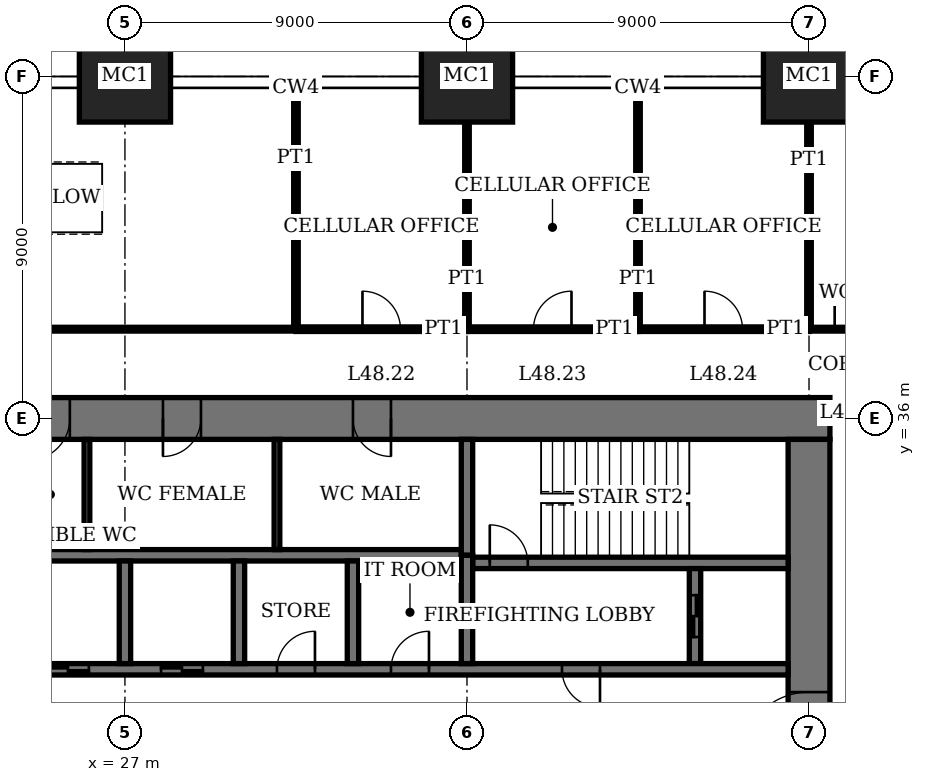
"""IFC4 building model, lengths in metres.
Left out: names, types, materials, properties, quantities, classifications, styles, units other than length and angle.
Written with IfcOpenShell. Run it as: python <this file> out.ifc"""

import sys

from ifc_helpers import new_model, si_unit, direction, frame, frame_2d, origin, origin_2d, place, context, subcontext, project, spatial, rectangle, extrude, element, fill, save


model = new_model("IFC4")
c1 = context("Model", 3, precision=1e-05, world=origin(), true_north=direction((0.0, 1.0)))
c2 = subcontext(c1, "Body", "Model", "MODEL_VIEW")
j1 = project(units=[si_unit("LENGTHUNIT", "METRE"), si_unit("PLANEANGLEUNIT", "RADIAN")], contexts=[c1])
p1 = place(None, origin())
s1 = spatial("IfcSite", under=j1, at=p1, CompositionType="ELEMENT")
p2 = place(p1, origin())
s2 = spatial("IfcBuilding", under=s1, at=p2, CompositionType="ELEMENT")
p3 = place(p2, frame((0.0, 0.0, 198.2)))
s3 = spatial("IfcBuildingStorey", under=s2, at=p3, CompositionType="ELEMENT", Elevation=198.2)
for number, where, z_axis, x_axis in (
    (1, (27.0, 45.0, 0.0), (0.0, 0.0, 1.0), (1.0, 0.0, 0.0)),
    (2, (36.0, 45.0, 0.0), (0.0, 0.0, 1.0), (1.0, 0.0, 0.0)),
    (3, (45.0, 45.0, 0.0), (0.0, 0.0, 1.0), (1.0, 0.0, 0.0)),
):
    element("IfcColumn", number, at=place(p3, frame(where, z_axis=z_axis, x_axis=x_axis)), inside=s3, PredefinedType="COLUMN", context=c2, shape_type="SweptSolid", body=[
        extrude(rectangle(XDim=2.4, YDim=2.4, at=origin_2d()), origin(), (0.0, 0.0, 1.0), 4.0),
    ])
p4 = place(p3, frame((45.55, 36.0, 0.0), z_axis=(0.0, 0.0, 1.0), x_axis=(-1.0, 0.0, 0.0)))
e4 = element("IfcWall", 4, at=p4, inside=s3, PredefinedType="SHEAR", context=c2, shape_type="SweptSolid", body=[
    extrude(rectangle(XDim=28.1, YDim=1.1, at=frame_2d((14.05, 0.0))), origin(), (0.0, 0.0, 1.0), 4.0),
])
p5 = place(p4, frame((11.55, 0.0, 0.0)))
e5 = element("IfcOpeningElement", 5, at=p5, cuts=e4, PredefinedType="OPENING", context=c2, shape_type="SweptSolid", body=[
    extrude(rectangle(XDim=1.0, YDim=2.4, at=frame_2d((0.5, 1.2))), frame((0.0, 0.56, 0.0), z_axis=(0.0, -1.0, 0.0), x_axis=(1.0, 0.0, 0.0)), (0.0, 0.0, 1.0), 1.12),
])
p6 = place(p4, frame((16.55, 0.0, 0.0)))
e6 = element("IfcOpeningElement", 6, at=p6, cuts=e4, PredefinedType="OPENING", context=c2, shape_type="SweptSolid", body=[
    extrude(rectangle(XDim=1.0, YDim=2.4, at=frame_2d((0.5, 1.2))), frame((0.0, 0.56, 0.0), z_axis=(0.0, -1.0, 0.0), x_axis=(1.0, 0.0, 0.0)), (0.0, 0.0, 1.0), 1.12),
])
p7 = place(p4, frame((20.0, 0.0, 0.0)))
e7 = element("IfcOpeningElement", 7, at=p7, cuts=e4, PredefinedType="OPENING", context=c2, shape_type="SweptSolid", body=[
    extrude(rectangle(XDim=1.1, YDim=2.4, at=frame_2d((0.55, 1.2))), frame((0.0, 0.56, 0.0), z_axis=(0.0, -1.0, 0.0), x_axis=(1.0, 0.0, 0.0)), (0.0, 0.0, 1.0), 1.12),
])
p8 = place(p4, frame((24.05, 0.0, 0.0)))
e8 = element("IfcOpeningElement", 8, at=p8, cuts=e4, PredefinedType="OPENING", context=c2, shape_type="SweptSolid", body=[
    extrude(rectangle(XDim=1.0, YDim=2.4, at=frame_2d((0.5, 1.2))), frame((0.0, 0.56, 0.0), z_axis=(0.0, -1.0, 0.0), x_axis=(1.0, 0.0, 0.0)), (0.0, 0.0, 1.0), 1.12),
])
p9 = place(p3, frame((45.0, 18.55, 0.0), z_axis=(0.0, 0.0, 1.0), x_axis=(0.0, 1.0, 0.0)))
e9 = element("IfcWall", 9, at=p9, inside=s3, PredefinedType="SHEAR", context=c2, shape_type="SweptSolid", body=[
    extrude(rectangle(XDim=16.9, YDim=1.1, at=frame_2d((8.45, 0.0))), origin(), (0.0, 0.0, 1.0), 4.0),
])
p10 = place(p9, frame((8.45, 0.0, 0.0)))
e10 = element("IfcOpeningElement", 10, at=p10, cuts=e9, PredefinedType="OPENING", context=c2, shape_type="SweptSolid", body=[
    extrude(rectangle(XDim=1.8, YDim=2.4, at=frame_2d((0.9, 1.2))), frame((0.0, 0.56, 0.0), z_axis=(0.0, -1.0, 0.0), x_axis=(1.0, 0.0, 0.0)), (0.0, 0.0, 1.0), 1.12),
])
p11 = place(p3, frame((36.15, 32.2, 0.0), z_axis=(0.0, 0.0, 1.0), x_axis=(1.0, 0.0, 0.0)))
e11 = element("IfcWall", 11, at=p11, inside=s3, PredefinedType="SHEAR", context=c2, shape_type="SweptSolid", body=[
    extrude(rectangle(XDim=8.3, YDim=0.3, at=frame_2d((4.15, 0.0))), origin(), (0.0, 0.0, 1.0), 4.0),
])
p12 = place(p11, frame((0.45, 0.0, 0.0)))
e12 = element("IfcOpeningElement", 12, at=p12, cuts=e11, PredefinedType="OPENING", context=c2, shape_type="SweptSolid", body=[
    extrude(rectangle(XDim=1.0, YDim=2.4, at=frame_2d((0.5, 1.2))), frame((0.0, 0.16, 0.0), z_axis=(0.0, -1.0, 0.0), x_axis=(1.0, 0.0, 0.0)), (0.0, 0.0, 1.0), 0.32),
])
p13 = place(p3, frame((36.0, 32.4, 0.0), z_axis=(0.0, 0.0, 1.0), x_axis=(0.0, 1.0, 0.0)))
e13 = element("IfcWall", 13, at=p13, inside=s3, PredefinedType="SHEAR", context=c2, shape_type="SweptSolid", body=[
    extrude(rectangle(XDim=3.05, YDim=0.3, at=frame_2d((1.525, 0.0))), origin(), (0.0, 0.0, 1.0), 4.0),
])
p14 = place(p3, frame((42.0, 29.55, 0.0), z_axis=(0.0, 0.0, 1.0), x_axis=(0.0, 1.0, 0.0)))
e14 = element("IfcWall", 14, at=p14, inside=s3, PredefinedType="SHEAR", context=c2, shape_type="SweptSolid", body=[
    extrude(rectangle(XDim=2.5, YDim=0.3, at=frame_2d((1.25, 0.0))), origin(), (0.0, 0.0, 1.0), 4.0),
])
p15 = place(p14, frame((0.7, 0.0, 0.0)))
e15 = element("IfcOpeningElement", 15, at=p15, cuts=e14, PredefinedType="OPENING", context=c2, shape_type="SweptSolid", body=[
    extrude(rectangle(XDim=1.1, YDim=2.4, at=frame_2d((0.55, 1.2))), frame((0.0, 0.16, 0.0), z_axis=(0.0, -1.0, 0.0), x_axis=(1.0, 0.0, 0.0)), (0.0, 0.0, 1.0), 0.32),
])
p16 = place(p3, frame((18.55, 29.4, 0.0), z_axis=(0.0, 0.0, 1.0), x_axis=(1.0, 0.0, 0.0)))
e16 = element("IfcWall", 16, at=p16, inside=s3, PredefinedType="SHEAR", context=c2, shape_type="SweptSolid", body=[
    extrude(rectangle(XDim=25.9, YDim=0.3, at=frame_2d((12.95, 0.0))), origin(), (0.0, 0.0, 1.0), 4.0),
])
p17 = place(p16, frame((19.95, 0.0, 0.0)))
e17 = element("IfcOpeningElement", 17, at=p17, cuts=e16, PredefinedType="OPENING", context=c2, shape_type="SweptSolid", body=[
    extrude(rectangle(XDim=1.0, YDim=2.4, at=frame_2d((0.5, 1.2))), frame((0.0, 0.16, 0.0), z_axis=(0.0, -1.0, 0.0), x_axis=(1.0, 0.0, 0.0)), (0.0, 0.0, 1.0), 0.32),
])
p18 = place(p16, frame((0.5, 0.0, 0.0)))
e18 = element("IfcOpeningElement", 18, at=p18, cuts=e16, PredefinedType="OPENING", context=c2, shape_type="SweptSolid", body=[
    extrude(rectangle(XDim=0.9, YDim=2.1, at=frame_2d((0.45, 1.05))), frame((0.0, 0.16, 0.0), z_axis=(0.0, -1.0, 0.0), x_axis=(1.0, 0.0, 0.0)), (0.0, 0.0, 1.0), 0.32),
])
p19 = place(p16, frame((15.45, 0.0, 0.0)))
e19 = element("IfcOpeningElement", 19, at=p19, cuts=e16, PredefinedType="OPENING", context=c2, shape_type="SweptSolid", body=[
    extrude(rectangle(XDim=1.0, YDim=2.4, at=frame_2d((0.5, 1.2))), frame((0.0, 0.16, 0.0), z_axis=(0.0, -1.0, 0.0), x_axis=(1.0, 0.0, 0.0)), (0.0, 0.0, 1.0), 0.32),
])
p20 = place(p16, frame((12.45, 0.0, 0.0)))
e20 = element("IfcOpeningElement", 20, at=p20, cuts=e16, PredefinedType="OPENING", context=c2, shape_type="SweptSolid", body=[
    extrude(rectangle(XDim=1.0, YDim=2.4, at=frame_2d((0.5, 1.2))), frame((0.0, 0.16, 0.0), z_axis=(0.0, -1.0, 0.0), x_axis=(1.0, 0.0, 0.0)), (0.0, 0.0, 1.0), 0.32),
])
p21 = place(p16, frame((9.4, 0.0, 0.0)))
e21 = element("IfcOpeningElement", 21, at=p21, cuts=e16, PredefinedType="OPENING", context=c2, shape_type="SweptSolid", body=[
    extrude(rectangle(XDim=1.1, YDim=2.4, at=frame_2d((0.55, 1.2))), frame((0.0, 0.16, 0.0), z_axis=(0.0, -1.0, 0.0), x_axis=(1.0, 0.0, 0.0)), (0.0, 0.0, 1.0), 0.32),
])
p22 = place(p16, frame((6.4, 0.0, 0.0)))
e22 = element("IfcOpeningElement", 22, at=p22, cuts=e16, PredefinedType="OPENING", context=c2, shape_type="SweptSolid", body=[
    extrude(rectangle(XDim=1.1, YDim=2.4, at=frame_2d((0.55, 1.2))), frame((0.0, 0.16, 0.0), z_axis=(0.0, -1.0, 0.0), x_axis=(1.0, 0.0, 0.0)), (0.0, 0.0, 1.0), 0.32),
])
p23 = place(p16, frame((3.3, 0.0, 0.0)))
e23 = element("IfcOpeningElement", 23, at=p23, cuts=e16, PredefinedType="OPENING", context=c2, shape_type="SweptSolid", body=[
    extrude(rectangle(XDim=1.3, YDim=2.4, at=frame_2d((0.65, 1.2))), frame((0.0, 0.16, 0.0), z_axis=(0.0, -1.0, 0.0), x_axis=(1.0, 0.0, 0.0)), (0.0, 0.0, 1.0), 0.32),
])
p24 = place(p3, frame((18.55, 32.4, 0.0), z_axis=(0.0, 0.0, 1.0), x_axis=(1.0, 0.0, 0.0)))
e24 = element("IfcWall", 24, at=p24, inside=s3, PredefinedType="SHEAR", context=c2, shape_type="SweptSolid", body=[
    extrude(rectangle(XDim=17.3, YDim=0.3, at=frame_2d((8.65, 0.0))), origin(), (0.0, 0.0, 1.0), 4.0),
])
for number, where, z_axis, x_axis in (
    (25, (33.0, 29.55, 0.0), (0.0, 0.0, 1.0), (0.0, 1.0, 0.0)),
    (26, (30.0, 29.55, 0.0), (0.0, 0.0, 1.0), (0.0, 1.0, 0.0)),
    (27, (27.0, 29.55, 0.0), (0.0, 0.0, 1.0), (0.0, 1.0, 0.0)),
):
    element("IfcWall", number, at=place(p3, frame(where, z_axis=z_axis, x_axis=x_axis)), inside=s3, PredefinedType="SHEAR", context=c2, shape_type="SweptSolid", body=[
        extrude(rectangle(XDim=2.7, YDim=0.3, at=frame_2d((1.35, 0.0))), origin(), (0.0, 0.0, 1.0), 4.0),
    ])
p25 = place(p3, frame((36.0, 29.55, 0.0), z_axis=(0.0, 0.0, 1.0), x_axis=(0.0, 1.0, 0.0)))
e28 = element("IfcWall", 28, at=p25, inside=s3, PredefinedType="SHEAR", context=c2, shape_type="SweptSolid", body=[
    extrude(rectangle(XDim=2.85, YDim=0.3, at=frame_2d((1.425, 0.0))), origin(), (0.0, 0.0, 1.0), 4.0),
])
p26 = place(p3, frame((31.5, 38.35, 0.0), z_axis=(0.0, 0.0, 1.0), x_axis=(1.0, 0.0, 0.0)))
e29 = element("IfcWall", 29, at=p26, inside=s3, PredefinedType="PARTITIONING", context=c2, shape_type="SweptSolid", body=[
    extrude(rectangle(XDim=4.5, YDim=0.12, at=frame_2d((2.25, 0.0))), origin(), (0.0, 0.0, 1.0), 3.75),
])
p27 = place(p26, frame((1.75, 0.0, 0.0)))
e30 = element("IfcOpeningElement", 30, at=p27, cuts=e29, PredefinedType="OPENING", context=c2, shape_type="SweptSolid", body=[
    extrude(rectangle(XDim=1.0, YDim=2.4, at=frame_2d((0.5, 1.2))), frame((0.0, 0.07, 0.0), z_axis=(0.0, -1.0, 0.0), x_axis=(1.0, 0.0, 0.0)), (0.0, 0.0, 1.0), 0.14),
])
p28 = place(p3, frame((36.0, 38.35, 0.0), z_axis=(0.0, 0.0, 1.0), x_axis=(1.0, 0.0, 0.0)))
e31 = element("IfcWall", 31, at=p28, inside=s3, PredefinedType="PARTITIONING", context=c2, shape_type="SweptSolid", body=[
    extrude(rectangle(XDim=4.5, YDim=0.12, at=frame_2d((2.25, 0.0))), origin(), (0.0, 0.0, 1.0), 3.75),
])
p29 = place(p28, frame((1.75, 0.0, 0.0)))
e32 = element("IfcOpeningElement", 32, at=p29, cuts=e31, PredefinedType="OPENING", context=c2, shape_type="SweptSolid", body=[
    extrude(rectangle(XDim=1.0, YDim=2.4, at=frame_2d((0.5, 1.2))), frame((0.0, 0.07, 0.0), z_axis=(0.0, -1.0, 0.0), x_axis=(1.0, 0.0, 0.0)), (0.0, 0.0, 1.0), 0.14),
])
p30 = place(p3, frame((40.5, 38.35, 0.0), z_axis=(0.0, 0.0, 1.0), x_axis=(1.0, 0.0, 0.0)))
e33 = element("IfcWall", 33, at=p30, inside=s3, PredefinedType="PARTITIONING", context=c2, shape_type="SweptSolid", body=[
    extrude(rectangle(XDim=4.5, YDim=0.12, at=frame_2d((2.25, 0.0))), origin(), (0.0, 0.0, 1.0), 3.75),
])
p31 = place(p30, frame((1.75, 0.0, 0.0)))
e34 = element("IfcOpeningElement", 34, at=p31, cuts=e33, PredefinedType="OPENING", context=c2, shape_type="SweptSolid", body=[
    extrude(rectangle(XDim=1.0, YDim=2.4, at=frame_2d((0.5, 1.2))), frame((0.0, 0.07, 0.0), z_axis=(0.0, -1.0, 0.0), x_axis=(1.0, 0.0, 0.0)), (0.0, 0.0, 1.0), 0.14),
])
p32 = place(p3, frame((15.65, 38.35, 0.0), z_axis=(0.0, 0.0, 1.0), x_axis=(1.0, 0.0, 0.0)))
e35 = element("IfcWall", 35, at=p32, inside=s3, PredefinedType="PARTITIONING", context=c2, shape_type="SweptSolid", body=[
    extrude(rectangle(XDim=15.85, YDim=0.1, at=frame_2d((7.925, 0.0))), origin(), (0.0, 0.0, 1.0), 3.75),
])
p33 = place(p32, frame((7.425, 0.0, 0.0)))
e36 = element("IfcOpeningElement", 36, at=p33, cuts=e35, PredefinedType="OPENING", context=c2, shape_type="SweptSolid", body=[
    extrude(rectangle(XDim=1.0, YDim=2.4, at=frame_2d((0.5, 1.2))), frame((0.0, 0.06, 0.0), z_axis=(0.0, -1.0, 0.0), x_axis=(1.0, 0.0, 0.0)), (0.0, 0.0, 1.0), 0.12),
])
p34 = place(p3, frame((45.0, 38.35, 0.0), z_axis=(0.0, 0.0, 1.0), x_axis=(1.0, 0.0, 0.0)))
e37 = element("IfcWall", 37, at=p34, inside=s3, PredefinedType="PARTITIONING", context=c2, shape_type="SweptSolid", body=[
    extrude(rectangle(XDim=2.35, YDim=0.1, at=frame_2d((1.175, 0.0))), origin(), (0.0, 0.0, 1.0), 3.75),
])
p35 = place(p34, frame((0.675, 0.0, 0.0)))
e38 = element("IfcOpeningElement", 38, at=p35, cuts=e37, PredefinedType="OPENING", context=c2, shape_type="SweptSolid", body=[
    extrude(rectangle(XDim=1.0, YDim=2.4, at=frame_2d((0.5, 1.2))), frame((0.0, 0.06, 0.0), z_axis=(0.0, -1.0, 0.0), x_axis=(1.0, 0.0, 0.0)), (0.0, 0.0, 1.0), 0.12),
])
p36 = place(p3, frame((31.5, 38.35, 0.0), z_axis=(0.0, 0.0, 1.0), x_axis=(0.0, 1.0, 0.0)))
e39 = element("IfcWall", 39, at=p36, inside=s3, PredefinedType="PARTITIONING", context=c2, shape_type="SweptSolid", body=[
    extrude(rectangle(XDim=6.34, YDim=0.12, at=frame_2d((3.17, 0.0))), origin(), (0.0, 0.0, 1.0), 3.75),
])
p37 = place(p3, frame((36.0, 38.35, 0.0), z_axis=(0.0, 0.0, 1.0), x_axis=(0.0, 1.0, 0.0)))
e40 = element("IfcWall", 40, at=p37, inside=s3, PredefinedType="PARTITIONING", context=c2, shape_type="SweptSolid", body=[
    extrude(rectangle(XDim=5.45, YDim=0.12, at=frame_2d((2.725, 0.0))), origin(), (0.0, 0.0, 1.0), 3.05),
])
p38 = place(p3, frame((40.5, 38.35, 0.0), z_axis=(0.0, 0.0, 1.0), x_axis=(0.0, 1.0, 0.0)))
e41 = element("IfcWall", 41, at=p38, inside=s3, PredefinedType="PARTITIONING", context=c2, shape_type="SweptSolid", body=[
    extrude(rectangle(XDim=6.34, YDim=0.12, at=frame_2d((3.17, 0.0))), origin(), (0.0, 0.0, 1.0), 3.75),
])
p39 = place(p3, frame((45.0, 38.35, 0.0), z_axis=(0.0, 0.0, 1.0), x_axis=(0.0, 1.0, 0.0)))
e42 = element("IfcWall", 42, at=p39, inside=s3, PredefinedType="PARTITIONING", context=c2, shape_type="SweptSolid", body=[
    extrude(rectangle(XDim=5.45, YDim=0.12, at=frame_2d((2.725, 0.0))), origin(), (0.0, 0.0, 1.0), 3.05),
])
for number, where, z_axis, x_axis in (
    (43, (31.0, 32.55, 0.0), (0.0, 0.0, 1.0), (0.0, 1.0, 0.0)),
    (44, (26.0, 32.55, 0.0), (0.0, 0.0, 1.0), (0.0, 1.0, 0.0)),
):
    element("IfcWall", number, at=place(p3, frame(where, z_axis=z_axis, x_axis=x_axis)), inside=s3, PredefinedType="PARTITIONING", context=c2, shape_type="SweptSolid", body=[
        extrude(rectangle(XDim=2.9, YDim=0.15, at=frame_2d((1.45, 0.0))), origin(), (0.0, 0.0, 1.0), 3.75),
    ])
p40 = place(p10, origin())
e45 = element("IfcDoor", 45, at=p40, inside=s3, OperationType="DOUBLE_DOOR_DOUBLE_SWING", PredefinedType="DOOR", context=c2, shape_type="SweptSolid", body=[
    extrude(rectangle(XDim=1.8, YDim=2.4, at=frame_2d((0.9, 1.2))), frame((0.0, 0.03, 0.0), z_axis=(0.0, -1.0, 0.0), x_axis=(1.0, 0.0, 0.0)), (0.0, 0.0, 1.0), 0.06),
    extrude(rectangle(XDim=0.04, YDim=2.4, at=frame_2d((0.02, 1.2))), frame((0.0, 0.55, 0.0), z_axis=(0.0, -1.0, 0.0), x_axis=(1.0, 0.0, 0.0)), (0.0, 0.0, 1.0), 1.1),
    extrude(rectangle(XDim=0.04, YDim=2.4, at=frame_2d((1.78, 1.2))), frame((0.0, 0.55, 0.0), z_axis=(0.0, -1.0, 0.0), x_axis=(1.0, 0.0, 0.0)), (0.0, 0.0, 1.0), 1.1),
    extrude(rectangle(XDim=1.8, YDim=0.04, at=frame_2d((0.9, 2.38))), frame((0.0, 0.55, 0.0), z_axis=(0.0, -1.0, 0.0), x_axis=(1.0, 0.0, 0.0)), (0.0, 0.0, 1.0), 1.1),
])
fill(e10, e45)
p41 = place(p5, origin())
e46 = element("IfcDoor", 46, at=p41, inside=s3, OperationType="SINGLE_SWING_RIGHT", PredefinedType="DOOR", context=c2, shape_type="SweptSolid", body=[
    extrude(rectangle(XDim=1.0, YDim=2.4, at=frame_2d((0.5, 1.2))), frame((0.0, 0.025, 0.0), z_axis=(0.0, -1.0, 0.0), x_axis=(1.0, 0.0, 0.0)), (0.0, 0.0, 1.0), 0.05),
    extrude(rectangle(XDim=0.04, YDim=2.4, at=frame_2d((0.02, 1.2))), frame((0.0, 0.4, 0.0), z_axis=(0.0, -1.0, 0.0), x_axis=(1.0, 0.0, 0.0)), (0.0, 0.0, 1.0), 0.8),
    extrude(rectangle(XDim=0.04, YDim=2.4, at=frame_2d((0.98, 1.2))), frame((0.0, 0.4, 0.0), z_axis=(0.0, -1.0, 0.0), x_axis=(1.0, 0.0, 0.0)), (0.0, 0.0, 1.0), 0.8),
    extrude(rectangle(XDim=1.0, YDim=0.04, at=frame_2d((0.5, 2.38))), frame((0.0, 0.4, 0.0), z_axis=(0.0, -1.0, 0.0), x_axis=(1.0, 0.0, 0.0)), (0.0, 0.0, 1.0), 0.8),
])
fill(e5, e46)
p42 = place(p6, origin())
e47 = element("IfcDoor", 47, at=p42, inside=s3, OperationType="SINGLE_SWING_LEFT", PredefinedType="DOOR", context=c2, shape_type="SweptSolid", body=[
    extrude(rectangle(XDim=1.0, YDim=2.4, at=frame_2d((0.5, 1.2))), frame((0.0, 0.025, 0.0), z_axis=(0.0, -1.0, 0.0), x_axis=(1.0, 0.0, 0.0)), (0.0, 0.0, 1.0), 0.05),
    extrude(rectangle(XDim=0.04, YDim=2.4, at=frame_2d((0.02, 1.2))), frame((0.0, 0.4, 0.0), z_axis=(0.0, -1.0, 0.0), x_axis=(1.0, 0.0, 0.0)), (0.0, 0.0, 1.0), 0.8),
    extrude(rectangle(XDim=0.04, YDim=2.4, at=frame_2d((0.98, 1.2))), frame((0.0, 0.4, 0.0), z_axis=(0.0, -1.0, 0.0), x_axis=(1.0, 0.0, 0.0)), (0.0, 0.0, 1.0), 0.8),
    extrude(rectangle(XDim=1.0, YDim=0.04, at=frame_2d((0.5, 2.38))), frame((0.0, 0.4, 0.0), z_axis=(0.0, -1.0, 0.0), x_axis=(1.0, 0.0, 0.0)), (0.0, 0.0, 1.0), 0.8),
])
fill(e6, e47)
p43 = place(p7, origin())
e48 = element("IfcDoor", 48, at=p43, inside=s3, OperationType="SINGLE_SWING_LEFT", PredefinedType="DOOR", context=c2, shape_type="SweptSolid", body=[
    extrude(rectangle(XDim=1.1, YDim=2.4, at=frame_2d((0.55, 1.2))), frame((0.0, 0.025, 0.0), z_axis=(0.0, -1.0, 0.0), x_axis=(1.0, 0.0, 0.0)), (0.0, 0.0, 1.0), 0.05),
    extrude(rectangle(XDim=0.04, YDim=2.4, at=frame_2d((0.02, 1.2))), frame((0.0, 0.44, 0.0), z_axis=(0.0, -1.0, 0.0), x_axis=(1.0, 0.0, 0.0)), (0.0, 0.0, 1.0), 0.88),
    extrude(rectangle(XDim=0.04, YDim=2.4, at=frame_2d((1.08, 1.2))), frame((0.0, 0.44, 0.0), z_axis=(0.0, -1.0, 0.0), x_axis=(1.0, 0.0, 0.0)), (0.0, 0.0, 1.0), 0.88),
    extrude(rectangle(XDim=1.1, YDim=0.04, at=frame_2d((0.55, 2.38))), frame((0.0, 0.44, 0.0), z_axis=(0.0, -1.0, 0.0), x_axis=(1.0, 0.0, 0.0)), (0.0, 0.0, 1.0), 0.88),
])
fill(e7, e48)
p44 = place(p12, origin())
e49 = element("IfcDoor", 49, at=p44, inside=s3, OperationType="SINGLE_SWING_RIGHT", PredefinedType="DOOR", context=c2, shape_type="SweptSolid", body=[
    extrude(rectangle(XDim=1.0, YDim=2.4, at=frame_2d((0.5, 1.2))), frame((0.0, 0.03, 0.0), z_axis=(0.0, -1.0, 0.0), x_axis=(1.0, 0.0, 0.0)), (0.0, 0.0, 1.0), 0.06),
])
fill(e12, e49)
p45 = place(p17, origin())
e50 = element("IfcDoor", 50, at=p45, inside=s3, OperationType="SINGLE_SWING_RIGHT", PredefinedType="DOOR", context=c2, shape_type="SweptSolid", body=[
    extrude(rectangle(XDim=1.0, YDim=2.4, at=frame_2d((0.5, 1.2))), frame((0.0, 0.03, 0.0), z_axis=(0.0, -1.0, 0.0), x_axis=(1.0, 0.0, 0.0)), (0.0, 0.0, 1.0), 0.06),
])
fill(e17, e50)
p46 = place(p27, origin())
e51 = element("IfcDoor", 51, at=p46, inside=s3, OperationType="SINGLE_SWING_RIGHT", PredefinedType="DOOR", context=c2, shape_type="SweptSolid", body=[
    extrude(rectangle(XDim=1.0, YDim=2.4, at=frame_2d((0.5, 1.2))), frame((0.0, 0.025, 0.0), z_axis=(0.0, -1.0, 0.0), x_axis=(1.0, 0.0, 0.0)), (0.0, 0.0, 1.0), 0.05),
])
fill(e30, e51)
p47 = place(p29, origin())
e52 = element("IfcDoor", 52, at=p47, inside=s3, OperationType="SINGLE_SWING_LEFT", PredefinedType="DOOR", context=c2, shape_type="SweptSolid", body=[
    extrude(rectangle(XDim=1.0, YDim=2.4, at=frame_2d((0.5, 1.2))), frame((0.0, 0.025, 0.0), z_axis=(0.0, -1.0, 0.0), x_axis=(1.0, 0.0, 0.0)), (0.0, 0.0, 1.0), 0.05),
])
fill(e32, e52)
p48 = place(p31, origin())
e53 = element("IfcDoor", 53, at=p48, inside=s3, OperationType="SINGLE_SWING_RIGHT", PredefinedType="DOOR", context=c2, shape_type="SweptSolid", body=[
    extrude(rectangle(XDim=1.0, YDim=2.4, at=frame_2d((0.5, 1.2))), frame((0.0, 0.025, 0.0), z_axis=(0.0, -1.0, 0.0), x_axis=(1.0, 0.0, 0.0)), (0.0, 0.0, 1.0), 0.05),
])
fill(e34, e53)
p49 = place(p35, origin())
e54 = element("IfcDoor", 54, at=p49, inside=s3, OperationType="SINGLE_SWING_RIGHT", PredefinedType="DOOR", context=c2, shape_type="SweptSolid", body=[
    extrude(rectangle(XDim=1.0, YDim=2.4, at=frame_2d((0.5, 1.2))), frame((0.0, 0.02, 0.0), z_axis=(0.0, -1.0, 0.0), x_axis=(1.0, 0.0, 0.0)), (0.0, 0.0, 1.0), 0.04),
])
fill(e38, e54)
p50 = place(p19, origin())
e55 = element("IfcDoor", 55, at=p50, inside=s3, OperationType="SINGLE_SWING_LEFT", PredefinedType="DOOR", context=c2, shape_type="SweptSolid", body=[
    extrude(rectangle(XDim=1.0, YDim=2.4, at=frame_2d((0.5, 1.2))), frame((0.0, 0.03, 0.0), z_axis=(0.0, -1.0, 0.0), x_axis=(1.0, 0.0, 0.0)), (0.0, 0.0, 1.0), 0.06),
])
fill(e19, e55)
p51 = place(p20, origin())
e56 = element("IfcDoor", 56, at=p51, inside=s3, OperationType="SINGLE_SWING_LEFT", PredefinedType="DOOR", context=c2, shape_type="SweptSolid", body=[
    extrude(rectangle(XDim=1.0, YDim=2.4, at=frame_2d((0.5, 1.2))), frame((0.0, 0.03, 0.0), z_axis=(0.0, -1.0, 0.0), x_axis=(1.0, 0.0, 0.0)), (0.0, 0.0, 1.0), 0.06),
])
fill(e20, e56)
p52 = place(p21, origin())
e57 = element("IfcDoor", 57, at=p52, inside=s3, OperationType="DOUBLE_DOOR_SLIDING", PredefinedType="DOOR", context=c2, shape_type="SweptSolid", body=[
    extrude(rectangle(XDim=1.1, YDim=2.4, at=frame_2d((0.55, 1.2))), frame((0.0, 0.02, 0.0), z_axis=(0.0, -1.0, 0.0), x_axis=(1.0, 0.0, 0.0)), (0.0, 0.0, 1.0), 0.04),
])
fill(e21, e57)
p53 = place(p22, origin())
e58 = element("IfcDoor", 58, at=p53, inside=s3, OperationType="DOUBLE_DOOR_SLIDING", PredefinedType="DOOR", context=c2, shape_type="SweptSolid", body=[
    extrude(rectangle(XDim=1.1, YDim=2.4, at=frame_2d((0.55, 1.2))), frame((0.0, 0.02, 0.0), z_axis=(0.0, -1.0, 0.0), x_axis=(1.0, 0.0, 0.0)), (0.0, 0.0, 1.0), 0.04),
])
fill(e22, e58)
p54 = place(p15, origin())
e59 = element("IfcDoor", 59, at=p54, inside=s3, OperationType="DOUBLE_DOOR_SLIDING", PredefinedType="DOOR", context=c2, shape_type="SweptSolid", body=[
    extrude(rectangle(XDim=1.1, YDim=2.4, at=frame_2d((0.55, 1.2))), frame((0.0, 0.03, 0.0), z_axis=(0.0, -1.0, 0.0), x_axis=(1.0, 0.0, 0.0)), (0.0, 0.0, 1.0), 0.06),
])
fill(e15, e59)
save(model, sys.argv[1])
